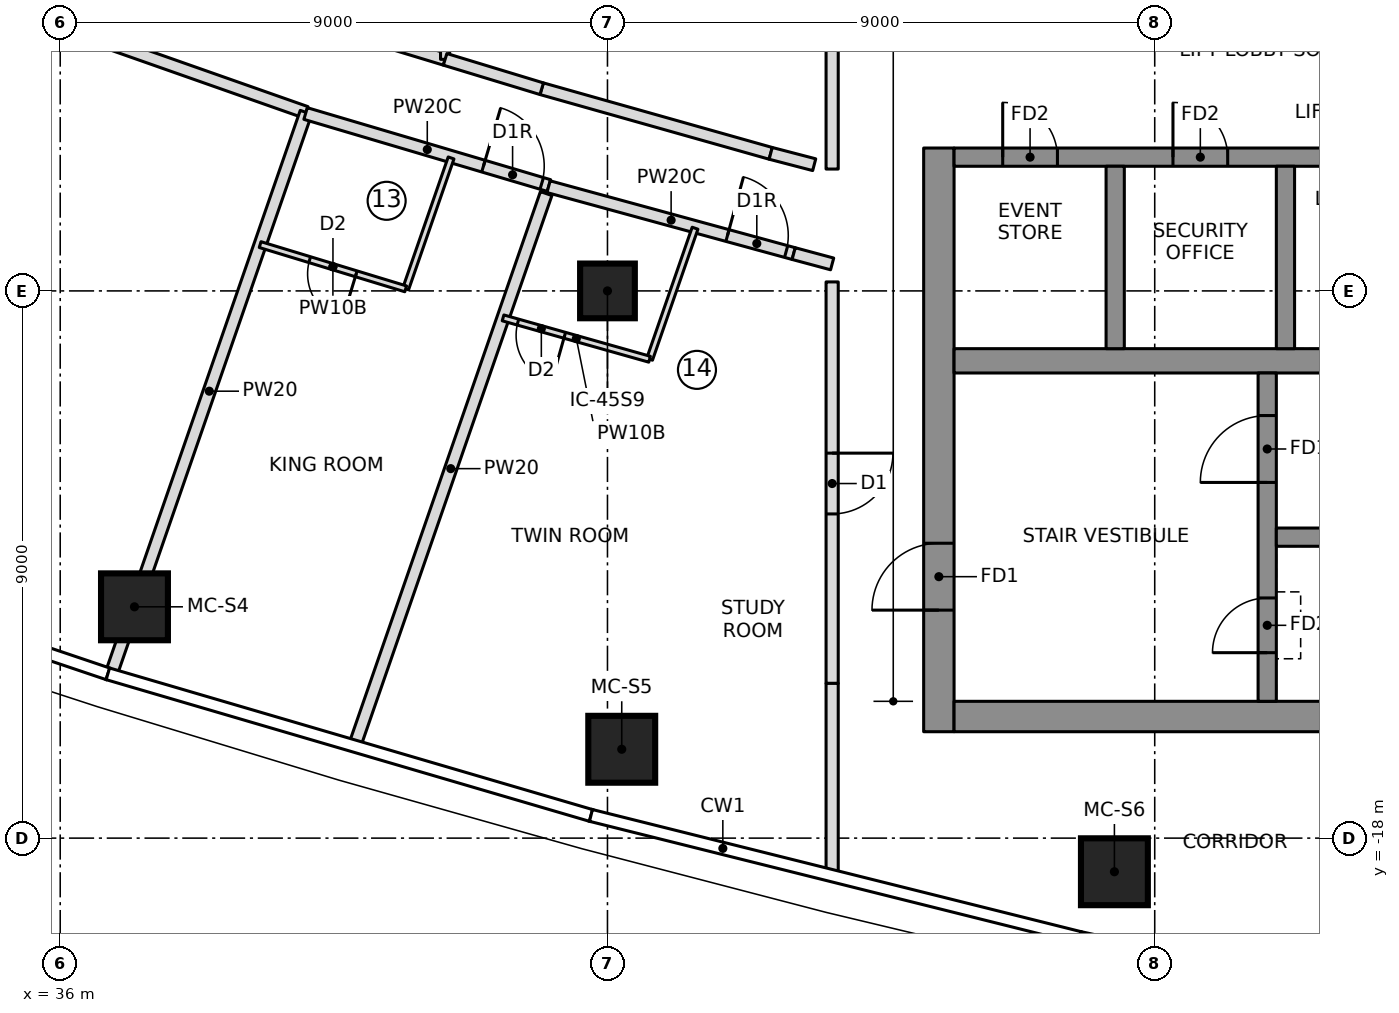
"""IFC4 building model, lengths in metres.
Left out: names, types, materials, properties, quantities, classifications, styles, units other than length and angle.
Written with IfcOpenShell. Run it as: python <this file> out.ifc"""

import sys

from ifc_helpers import new_model, si_unit, direction, frame, frame_2d, origin, origin_2d, place, context, subcontext, project, spatial, polyline, rectangle, outline, extrude, element, fill, save


model = new_model("IFC4")
c1 = context("Model", 3, precision=1e-05, world=origin(), true_north=direction((0.0, 1.0)))
c2 = subcontext(c1, "Body", "Model", "MODEL_VIEW")
j1 = project(units=[si_unit("LENGTHUNIT", "METRE"), si_unit("PLANEANGLEUNIT", "RADIAN")], contexts=[c1])
p1 = place(None, origin())
s1 = spatial("IfcSite", under=j1, at=p1, CompositionType="ELEMENT")
p2 = place(p1, origin())
s2 = spatial("IfcBuilding", under=s1, at=p2, CompositionType="ELEMENT")
p3 = place(p2, frame((0.0, 0.0, 271.45)))
s3 = spatial("IfcBuildingStorey", under=s2, at=p3, CompositionType="ELEMENT", Elevation=271.45)
p4 = place(p3, frame((50.45, -16.25, 0.0), z_axis=(0.0, 0.0, 1.0), x_axis=(0.0, 1.0, 0.0)))
e1 = element("IfcWall", 1, at=p4, inside=s3, PredefinedType="SHEAR", context=c2, shape_type="SweptSolid", body=[
    extrude(rectangle(XDim=9.6, YDim=0.5, at=frame_2d((4.8, 0.0))), origin(), (0.0, 0.0, 1.0), 3.55),
])
p5 = place(p4, frame((2.0, 0.0, 0.0)))
e2 = element("IfcOpeningElement", 2, at=p5, cuts=e1, PredefinedType="OPENING", context=c2, shape_type="SweptSolid", body=[
    extrude(rectangle(XDim=1.1, YDim=2.1, at=frame_2d((0.55, 1.05))), frame((0.0, 0.26, 0.0), z_axis=(0.0, -1.0, 0.0), x_axis=(1.0, 0.0, 0.0)), (0.0, 0.0, 1.0), 0.52),
])
p6 = place(p3, frame((50.7, -16.0, 0.0), z_axis=(0.0, 0.0, 1.0), x_axis=(1.0, 0.0, 0.0)))
e3 = element("IfcWall", 3, at=p6, inside=s3, PredefinedType="SHEAR", context=c2, shape_type="SweptSolid", body=[
    extrude(rectangle(XDim=13.52, YDim=0.5, at=frame_2d((6.76, 0.0))), origin(), (0.0, 0.0, 1.0), 3.55),
])
p7 = place(p3, frame((50.7, -10.15, 0.0), z_axis=(0.0, 0.0, 1.0), x_axis=(1.0, 0.0, 0.0)))
e4 = element("IfcWall", 4, at=p7, inside=s3, PredefinedType="SHEAR", context=c2, shape_type="SweptSolid", body=[
    extrude(rectangle(XDim=13.02, YDim=0.4, at=frame_2d((6.51, 0.0))), origin(), (0.0, 0.0, 1.0), 3.55),
])
p8 = place(p3, frame((50.7, -6.8, 0.0), z_axis=(0.0, 0.0, 1.0), x_axis=(1.0, 0.0, 0.0)))
e5 = element("IfcWall", 5, at=p8, inside=s3, PredefinedType="SHEAR", context=c2, shape_type="SweptSolid", body=[
    extrude(rectangle(XDim=10.9, YDim=0.3, at=frame_2d((5.45, 0.0))), origin(), (0.0, 0.0, 1.0), 3.55),
])
p9 = place(p8, frame((6.3, 0.0, 0.0)))
e6 = element("IfcOpeningElement", 6, at=p9, cuts=e5, PredefinedType="OPENING", context=c2, shape_type="SweptSolid", body=[
    extrude(rectangle(XDim=1.1, YDim=2.1, at=frame_2d((0.55, 1.05))), frame((0.0, 0.16, 0.0), z_axis=(0.0, -1.0, 0.0), x_axis=(1.0, 0.0, 0.0)), (0.0, 0.0, 1.0), 0.32),
])
p10 = place(p8, frame((9.1, 0.0, 0.0)))
e7 = element("IfcOpeningElement", 7, at=p10, cuts=e5, PredefinedType="OPENING", context=c2, shape_type="SweptSolid", body=[
    extrude(rectangle(XDim=1.1, YDim=2.1, at=frame_2d((0.55, 1.05))), frame((0.0, 0.16, 0.0), z_axis=(0.0, -1.0, 0.0), x_axis=(1.0, 0.0, 0.0)), (0.0, 0.0, 1.0), 0.32),
])
p11 = place(p8, frame((0.8, 0.0, 0.0)))
e8 = element("IfcOpeningElement", 8, at=p11, cuts=e5, PredefinedType="OPENING", context=c2, shape_type="SweptSolid", body=[
    extrude(rectangle(XDim=0.9, YDim=2.1, at=frame_2d((0.45, 1.05))), frame((0.0, 0.16, 0.0), z_axis=(0.0, -1.0, 0.0), x_axis=(1.0, 0.0, 0.0)), (0.0, 0.0, 1.0), 0.32),
])
p12 = place(p8, frame((3.6, 0.0, 0.0)))
e9 = element("IfcOpeningElement", 9, at=p12, cuts=e5, PredefinedType="OPENING", context=c2, shape_type="SweptSolid", body=[
    extrude(rectangle(XDim=0.9, YDim=2.1, at=frame_2d((0.45, 1.05))), frame((0.0, 0.16, 0.0), z_axis=(0.0, -1.0, 0.0), x_axis=(1.0, 0.0, 0.0)), (0.0, 0.0, 1.0), 0.32),
])
for number, where, z_axis, x_axis in (
    (10, (53.35, -9.95, 0.0), (0.0, 0.0, 1.0), (0.0, 1.0, 0.0)),
    (11, (56.15, -9.95, 0.0), (0.0, 0.0, 1.0), (0.0, 1.0, 0.0)),
):
    element("IfcWall", number, at=place(p3, frame(where, z_axis=z_axis, x_axis=x_axis)), inside=s3, PredefinedType="SHEAR", context=c2, shape_type="SweptSolid", body=[
        extrude(rectangle(XDim=3.0, YDim=0.3, at=frame_2d((1.5, 0.0))), origin(), (0.0, 0.0, 1.0), 3.55),
    ])
p13 = place(p3, frame((55.85, -15.75, 0.0), z_axis=(0.0, 0.0, 1.0), x_axis=(0.0, 1.0, 0.0)))
e12 = element("IfcWall", 12, at=p13, inside=s3, PredefinedType="SHEAR", context=c2, shape_type="SweptSolid", body=[
    extrude(rectangle(XDim=5.4, YDim=0.3, at=frame_2d((2.7, 0.0))), origin(), (0.0, 0.0, 1.0), 3.55),
])
p14 = place(p13, frame((3.6, 0.0, 0.0)))
e13 = element("IfcOpeningElement", 13, at=p14, cuts=e12, PredefinedType="OPENING", context=c2, shape_type="SweptSolid", body=[
    extrude(rectangle(XDim=1.1, YDim=2.1, at=frame_2d((0.55, 1.05))), frame((0.0, 0.16, 0.0), z_axis=(0.0, -1.0, 0.0), x_axis=(1.0, 0.0, 0.0)), (0.0, 0.0, 1.0), 0.32),
])
p15 = place(p13, frame((0.8, 0.0, 0.0)))
e14 = element("IfcOpeningElement", 14, at=p15, cuts=e12, PredefinedType="OPENING", context=c2, shape_type="SweptSolid", body=[
    extrude(rectangle(XDim=0.9, YDim=2.1, at=frame_2d((0.45, 1.05))), frame((0.0, 0.16, 0.0), z_axis=(0.0, -1.0, 0.0), x_axis=(1.0, 0.0, 0.0)), (0.0, 0.0, 1.0), 0.32),
])
p16 = place(p3, frame((56.0, -13.05, 0.0), z_axis=(0.0, 0.0, 1.0), x_axis=(1.0, 0.0, 0.0)))
e15 = element("IfcWall", 15, at=p16, inside=s3, PredefinedType="SHEAR", context=c2, shape_type="SweptSolid", body=[
    extrude(rectangle(XDim=7.72, YDim=0.3, at=frame_2d((3.86, 0.0))), origin(), (0.0, 0.0, 1.0), 3.55),
])
for number, where, z_axis, x_axis in (
    (16, (37.221, -14.196, 0.0), (0.0, 0.0, 1.0), (1.0, 0.0, 0.0)),
    (17, (45.235, -16.539, 0.0), (0.0, 0.0, 1.0), (1.0, 0.0, 0.0)),
    (18, (53.337, -18.553, 0.0), (0.0, 0.0, 1.0), (1.0, 0.0, 0.0)),
):
    element("IfcColumn", number, at=place(p3, frame(where, z_axis=z_axis, x_axis=x_axis)), inside=s3, PredefinedType="COLUMN", context=c2, shape_type="SweptSolid", body=[
        extrude(rectangle(XDim=1.1, YDim=1.1, at=origin_2d()), origin(), (0.0, 0.0, 1.0), 3.55),
    ])
p17 = place(p3, frame((45.0, -9.0, 0.0), z_axis=(0.0, 0.0, 1.0), x_axis=(1.0, 0.0, 0.0)))
e19 = element("IfcColumn", 19, at=p17, inside=s3, PredefinedType="COLUMN", context=c2, shape_type="SweptSolid", body=[
    extrude(rectangle(XDim=0.9, YDim=0.9, at=origin_2d()), origin(), (0.0, 0.0, 1.0), 3.55),
])
p18 = place(p3, frame((52.738, -19.732, 0.0), z_axis=(0.0, 0.0, 1.0), x_axis=(0.977020225348, -0.213146614471, 0.0)))
e20 = element("IfcWall", 20, at=p18, inside=s3, PredefinedType="NOTDEFINED", context=c2, shape_type="SweptSolid", body=[
    extrude(outline(polyline([(0.0, -0.2), (4.171, -0.2), (4.113, 0.2), (0.0, 0.2), (0.0, -0.2)])), origin(), (0.0, 0.0, 1.0), 3.25),
])
p19 = place(p3, frame((26.85, -1.423, 0.0), z_axis=(0.0, 0.0, 1.0), x_axis=(0.943328585164, -0.331860182022, 0.0)))
e21 = element("IfcWall", 21, at=p19, inside=s3, PredefinedType="PARTITIONING", context=c2, shape_type="SweptSolid", body=[
    extrude(rectangle(XDim=13.984, YDim=0.2, at=frame_2d((6.992, 0.0))), origin(), (0.0, 0.0, 1.0), 3.25),
])
p20 = place(p19, frame((3.05, 0.0, 0.0)))
e22 = element("IfcOpeningElement", 22, at=p20, cuts=e21, PredefinedType="OPENING", context=c2, shape_type="SweptSolid", body=[
    extrude(rectangle(XDim=1.5, YDim=2.1, at=frame_2d((0.75, 1.05))), frame((0.0, 0.11, 0.0), z_axis=(0.0, -1.0, 0.0), x_axis=(1.0, 0.0, 0.0)), (0.0, 0.0, 1.0), 0.22),
])
p21 = place(p3, frame((36.861, -15.235, 0.0), z_axis=(0.0, 0.0, 1.0), x_axis=(0.327710853631, 0.944778067279, 0.0)))
e23 = element("IfcWall", 23, at=p21, inside=s3, PredefinedType="PARTITIONING", context=c2, shape_type="SweptSolid", body=[
    extrude(rectangle(XDim=9.707, YDim=0.2, at=frame_2d((4.854, 0.0))), origin(), (0.0, 0.0, 1.0), 3.25),
])
p22 = place(p3, frame((40.035, -6.083, 0.0), z_axis=(0.0, 0.0, 1.0), x_axis=(0.958901312153, -0.283739799027, 0.0)))
e24 = element("IfcWall", 24, at=p22, inside=s3, PredefinedType="PARTITIONING", context=c2, shape_type="SweptSolid", body=[
    extrude(rectangle(XDim=4.174, YDim=0.2, at=frame_2d((2.087, 0.0))), origin(), (0.0, 0.0, 1.0), 3.25),
])
p23 = place(p22, frame((3.05, 0.0, 0.0)))
e25 = element("IfcOpeningElement", 25, at=p23, cuts=e24, PredefinedType="OPENING", context=c2, shape_type="SweptSolid", body=[
    extrude(rectangle(XDim=1.0, YDim=2.1, at=frame_2d((0.5, 1.05))), frame((0.0, 0.11, 0.0), z_axis=(0.0, -1.0, 0.0), x_axis=(1.0, 0.0, 0.0)), (0.0, 0.0, 1.0), 0.22),
])
p24 = place(p3, frame((42.428, -6.813, 0.0), z_axis=(0.0, 0.0, 1.0), x_axis=(-0.327743427431, -0.944766767925, 0.0)))
e26 = element("IfcWall", 26, at=p24, inside=s3, PredefinedType="PARTITIONING", context=c2, shape_type="SweptSolid", body=[
    extrude(rectangle(XDim=2.279, YDim=0.1, at=frame_2d((1.139, 0.0))), origin(), (0.0, 0.0, 1.0), 3.25),
])
p25 = place(p3, frame((41.681, -8.966, 0.0), z_axis=(0.0, 0.0, 1.0), x_axis=(-0.956723503196, 0.290998519638, 0.0)))
e27 = element("IfcWall", 27, at=p25, inside=s3, PredefinedType="PARTITIONING", context=c2, shape_type="SweptSolid", body=[
    extrude(rectangle(XDim=2.502, YDim=0.1, at=frame_2d((1.251, 0.0))), origin(), (0.0, 0.0, 1.0), 3.25),
])
p26 = place(p25, frame((0.85, 0.0, 0.0)))
e28 = element("IfcOpeningElement", 28, at=p26, cuts=e27, PredefinedType="OPENING", context=c2, shape_type="SweptSolid", body=[
    extrude(rectangle(XDim=0.8, YDim=2.1, at=frame_2d((0.4, 1.05))), frame((0.0, 0.06, 0.0), z_axis=(0.0, -1.0, 0.0), x_axis=(1.0, 0.0, 0.0)), (0.0, 0.0, 1.0), 0.12),
])
p27 = place(p3, frame((40.854, -16.447, 0.0), z_axis=(0.0, 0.0, 1.0), x_axis=(0.327714654767, 0.944776748788, 0.0)))
e29 = element("IfcWall", 29, at=p27, inside=s3, PredefinedType="PARTITIONING", context=c2, shape_type="SweptSolid", body=[
    extrude(rectangle(XDim=9.577, YDim=0.2, at=frame_2d((4.788, 0.0))), origin(), (0.0, 0.0, 1.0), 3.25),
])
p28 = place(p3, frame((44.031, -7.286, 0.0), z_axis=(0.0, 0.0, 1.0), x_axis=(0.964708521199, -0.263320088726, 0.0)))
e30 = element("IfcWall", 30, at=p28, inside=s3, PredefinedType="PARTITIONING", context=c2, shape_type="SweptSolid", body=[
    extrude(rectangle(XDim=4.179, YDim=0.2, at=frame_2d((2.089, 0.0))), origin(), (0.0, 0.0, 1.0), 3.25),
])
p29 = place(p28, frame((3.05, 0.0, 0.0)))
e31 = element("IfcOpeningElement", 31, at=p29, cuts=e30, PredefinedType="OPENING", context=c2, shape_type="SweptSolid", body=[
    extrude(rectangle(XDim=1.0, YDim=2.1, at=frame_2d((0.5, 1.05))), frame((0.0, 0.11, 0.0), z_axis=(0.0, -1.0, 0.0), x_axis=(1.0, 0.0, 0.0)), (0.0, 0.0, 1.0), 0.22),
])
p30 = place(p3, frame((46.44, -7.969, 0.0), z_axis=(0.0, 0.0, 1.0), x_axis=(-0.327764902685, -0.944759317799, 0.0)))
e32 = element("IfcWall", 32, at=p30, inside=s3, PredefinedType="PARTITIONING", context=c2, shape_type="SweptSolid", body=[
    extrude(rectangle(XDim=2.281, YDim=0.1, at=frame_2d((1.14, 0.0))), origin(), (0.0, 0.0, 1.0), 3.25),
])
p31 = place(p3, frame((45.693, -10.124, 0.0), z_axis=(0.0, 0.0, 1.0), x_axis=(-0.962409173596, 0.271603723424, 0.0)))
e33 = element("IfcWall", 33, at=p31, inside=s3, PredefinedType="PARTITIONING", context=c2, shape_type="SweptSolid", body=[
    extrude(rectangle(XDim=2.504, YDim=0.1, at=frame_2d((1.252, 0.0))), origin(), (0.0, 0.0, 1.0), 3.25),
])
p32 = place(p31, frame((1.45, 0.0, 0.0)))
e34 = element("IfcOpeningElement", 34, at=p32, cuts=e33, PredefinedType="OPENING", context=c2, shape_type="SweptSolid", body=[
    extrude(rectangle(XDim=0.8, YDim=2.1, at=frame_2d((0.4, 1.05))), frame((0.0, 0.06, 0.0), z_axis=(0.0, -1.0, 0.0), x_axis=(1.0, 0.0, 0.0)), (0.0, 0.0, 1.0), 0.12),
])
p33 = place(p3, frame((42.33, -5.191, 0.0), z_axis=(0.0, 0.0, 1.0), x_axis=(-0.956739496331, 0.290945933396, 0.0)))
e35 = element("IfcWall", 35, at=p33, inside=s3, PredefinedType="PARTITIONING", context=c2, shape_type="SweptSolid", body=[
    extrude(rectangle(XDim=2.252, YDim=0.2, at=frame_2d((1.126, 0.0))), origin(), (0.0, 0.0, 1.0), 3.25),
])
p34 = place(p3, frame((42.33, -5.191, 0.0), z_axis=(0.0, 0.0, 1.0), x_axis=(0.0, 1.0, 0.0)))
e36 = element("IfcWall", 36, at=p34, inside=s3, PredefinedType="PARTITIONING", context=c2, shape_type="SweptSolid", body=[
    extrude(rectangle(XDim=10.383, YDim=0.15, at=frame_2d((5.191, 0.0))), origin(), (0.0, 0.0, 1.0), 3.25),
])
p35 = place(p3, frame((47.684, -6.738, 0.0), z_axis=(0.0, 0.0, 1.0), x_axis=(-0.962411212211, 0.271596499628, 0.0)))
e37 = element("IfcWall", 37, at=p35, inside=s3, PredefinedType="PARTITIONING", context=c2, shape_type="SweptSolid", body=[
    extrude(rectangle(XDim=3.913, YDim=0.2, at=frame_2d((1.957, 0.0))), origin(), (0.0, 0.0, 1.0), 3.25),
])
p36 = place(p3, frame((43.918, -5.675, 0.0), z_axis=(0.0, 0.0, 1.0), x_axis=(-0.956702361065, 0.291068020115, 0.0)))
e38 = element("IfcWall", 38, at=p36, inside=s3, PredefinedType="PARTITIONING", context=c2, shape_type="SweptSolid", body=[
    extrude(rectangle(XDim=1.661, YDim=0.2, at=frame_2d((0.831, 0.0))), origin(), (0.0, 0.0, 1.0), 3.25),
])
p37 = place(p3, frame((48.4, -6.924, 0.0), z_axis=(0.0, 0.0, 1.0), x_axis=(-0.967585713416, 0.252542842294, 0.0)))
e39 = element("IfcWall", 39, at=p37, inside=s3, PredefinedType="PARTITIONING", context=c2, shape_type="SweptSolid", body=[
    extrude(rectangle(XDim=0.74, YDim=0.2, at=frame_2d((0.37, 0.0))), origin(), (0.0, 0.0, 1.0), 3.25),
])
p38 = place(p3, frame((48.695, -8.852, 0.0), z_axis=(0.0, 0.0, 1.0), x_axis=(0.0, -1.0, 0.0)))
e40 = element("IfcWall", 40, at=p38, inside=s3, PredefinedType="PARTITIONING", context=c2, shape_type="SweptSolid", body=[
    extrude(rectangle(XDim=6.603, YDim=0.2, at=frame_2d((3.302, 0.0))), origin(), (0.0, 0.0, 1.0), 3.25),
])
p39 = place(p38, frame((2.816, 0.0, 0.0)))
e41 = element("IfcOpeningElement", 41, at=p39, cuts=e40, PredefinedType="OPENING", context=c2, shape_type="SweptSolid", body=[
    extrude(rectangle(XDim=1.0, YDim=2.1, at=frame_2d((0.5, 1.05))), frame((0.0, 0.11, 0.0), z_axis=(0.0, -1.0, 0.0), x_axis=(1.0, 0.0, 0.0)), (0.0, 0.0, 1.0), 0.22),
])
p40 = place(p3, frame((48.695, 6.996, 0.0), z_axis=(0.0, 0.0, 1.0), x_axis=(0.0, -1.0, 0.0)))
e42 = element("IfcWall", 42, at=p40, inside=s3, PredefinedType="PARTITIONING", context=c2, shape_type="SweptSolid", body=[
    extrude(rectangle(XDim=13.992, YDim=0.2, at=frame_2d((6.996, 0.0))), origin(), (0.0, 0.0, 1.0), 3.25),
])
p41 = place(p3, frame((48.062, -8.386, 0.0), z_axis=(0.0, 0.0, 1.0), x_axis=(0.965669715173, -0.259772980114, 0.0)))
e43 = element("IfcWall", 43, at=p41, inside=s3, PredefinedType="PARTITIONING", context=c2, shape_type="SweptSolid", body=[
    extrude(rectangle(XDim=0.655, YDim=0.2, at=frame_2d((0.328, 0.0))), origin(), (0.0, 0.0, 1.0), 3.25),
])
p42 = place(p3, frame((48.695, -15.455, 0.0), z_axis=(0.0, 0.0, 1.0), x_axis=(0.0, -1.0, 0.0)))
e44 = element("IfcWall", 44, at=p42, inside=s3, PredefinedType="PARTITIONING", context=c2, shape_type="SweptSolid", body=[
    extrude(rectangle(XDim=3.098, YDim=0.2, at=frame_2d((1.549, 0.0))), origin(), (0.0, 0.0, 1.0), 3.25),
])
p43 = place(p26, origin())
e45 = element("IfcDoor", 45, at=p43, inside=s3, OperationType="SINGLE_SWING_LEFT", PredefinedType="DOOR", context=c2, shape_type="SweptSolid", body=[
    extrude(rectangle(XDim=0.8, YDim=2.1, at=frame_2d((0.4, 1.05))), frame((0.0, 0.025, 0.0), z_axis=(0.0, -1.0, 0.0), x_axis=(1.0, 0.0, 0.0)), (0.0, 0.0, 1.0), 0.05),
])
fill(e28, e45)
p44 = place(p23, origin())
e46 = element("IfcDoor", 46, at=p44, inside=s3, OperationType="SINGLE_SWING_RIGHT", PredefinedType="DOOR", context=c2, shape_type="SweptSolid", body=[
    extrude(rectangle(XDim=1.0, YDim=2.1, at=frame_2d((0.5, 1.05))), frame((0.0, 0.025, 0.0), z_axis=(0.0, -1.0, 0.0), x_axis=(1.0, 0.0, 0.0)), (0.0, 0.0, 1.0), 0.05),
])
fill(e25, e46)
p45 = place(p32, origin())
e47 = element("IfcDoor", 47, at=p45, inside=s3, OperationType="SINGLE_SWING_LEFT", PredefinedType="DOOR", context=c2, shape_type="SweptSolid", body=[
    extrude(rectangle(XDim=0.8, YDim=2.1, at=frame_2d((0.4, 1.05))), frame((0.0, 0.025, 0.0), z_axis=(0.0, -1.0, 0.0), x_axis=(1.0, 0.0, 0.0)), (0.0, 0.0, 1.0), 0.05),
])
fill(e34, e47)
p46 = place(p29, origin())
e48 = element("IfcDoor", 48, at=p46, inside=s3, OperationType="SINGLE_SWING_RIGHT", PredefinedType="DOOR", context=c2, shape_type="SweptSolid", body=[
    extrude(rectangle(XDim=1.0, YDim=2.1, at=frame_2d((0.5, 1.05))), frame((0.0, 0.025, 0.0), z_axis=(0.0, -1.0, 0.0), x_axis=(1.0, 0.0, 0.0)), (0.0, 0.0, 1.0), 0.05),
])
fill(e31, e48)
p47 = place(p39, origin())
e49 = element("IfcDoor", 49, at=p47, inside=s3, OperationType="SINGLE_SWING_LEFT", PredefinedType="DOOR", context=c2, shape_type="SweptSolid", body=[
    extrude(rectangle(XDim=1.0, YDim=2.1, at=frame_2d((0.5, 1.05))), frame((0.0, 0.025, 0.0), z_axis=(0.0, -1.0, 0.0), x_axis=(1.0, 0.0, 0.0)), (0.0, 0.0, 1.0), 0.05),
])
fill(e41, e49)
p48 = place(p14, origin())
e50 = element("IfcDoor", 50, at=p48, inside=s3, OperationType="SINGLE_SWING_RIGHT", PredefinedType="DOOR", context=c2, shape_type="SweptSolid", body=[
    extrude(rectangle(XDim=1.1, YDim=2.1, at=frame_2d((0.55, 1.05))), frame((0.0, 0.025, 0.0), z_axis=(0.0, -1.0, 0.0), x_axis=(1.0, 0.0, 0.0)), (0.0, 0.0, 1.0), 0.05),
])
fill(e13, e50)
p49 = place(p5, origin())
e51 = element("IfcDoor", 51, at=p49, inside=s3, OperationType="SINGLE_SWING_RIGHT", PredefinedType="DOOR", context=c2, shape_type="SweptSolid", body=[
    extrude(rectangle(XDim=1.1, YDim=2.1, at=frame_2d((0.55, 1.05))), frame((0.0, 0.025, 0.0), z_axis=(0.0, -1.0, 0.0), x_axis=(1.0, 0.0, 0.0)), (0.0, 0.0, 1.0), 0.05),
])
fill(e2, e51)
p50 = place(p15, origin())
e52 = element("IfcDoor", 52, at=p50, inside=s3, OperationType="SINGLE_SWING_LEFT", PredefinedType="DOOR", context=c2, shape_type="SweptSolid", body=[
    extrude(rectangle(XDim=0.9, YDim=2.1, at=frame_2d((0.45, 1.05))), frame((0.0, 0.025, 0.0), z_axis=(0.0, -1.0, 0.0), x_axis=(1.0, 0.0, 0.0)), (0.0, 0.0, 1.0), 0.05),
])
fill(e14, e52)
p51 = place(p11, origin())
e53 = element("IfcDoor", 53, at=p51, inside=s3, OperationType="SINGLE_SWING_LEFT", PredefinedType="DOOR", context=c2, shape_type="SweptSolid", body=[
    extrude(rectangle(XDim=0.9, YDim=2.1, at=frame_2d((0.45, 1.05))), frame((0.0, 0.025, 0.0), z_axis=(0.0, -1.0, 0.0), x_axis=(1.0, 0.0, 0.0)), (0.0, 0.0, 1.0), 0.05),
])
fill(e8, e53)
p52 = place(p12, origin())
e54 = element("IfcDoor", 54, at=p52, inside=s3, OperationType="SINGLE_SWING_LEFT", PredefinedType="DOOR", context=c2, shape_type="SweptSolid", body=[
    extrude(rectangle(XDim=0.9, YDim=2.1, at=frame_2d((0.45, 1.05))), frame((0.0, 0.025, 0.0), z_axis=(0.0, -1.0, 0.0), x_axis=(1.0, 0.0, 0.0)), (0.0, 0.0, 1.0), 0.05),
])
fill(e9, e54)
save(model, sys.argv[1])
